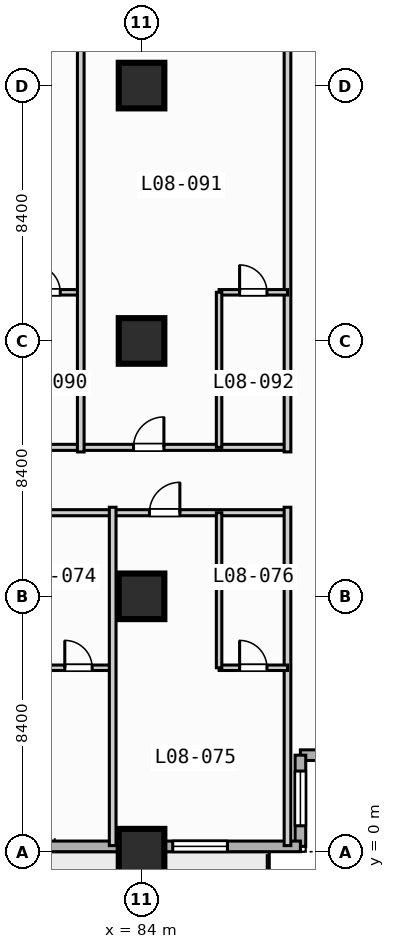
"""IFC4 building model, lengths in metres.
Left out: names, types, materials, properties, quantities, classifications, styles, units other than length and angle.
Written with IfcOpenShell. Run it as: python <this file> out.ifc"""

import sys

from ifc_helpers import new_model, si_unit, direction, frame, frame_2d, origin, origin_2d, place, context, subcontext, project, spatial, rectangle, extrude, element, fill, save


model = new_model("IFC4")
c1 = context("Model", 3, precision=1e-05, world=origin(), true_north=direction((0.0, 1.0)))
c2 = subcontext(c1, "Body", "Model", "MODEL_VIEW")
j1 = project(units=[si_unit("LENGTHUNIT", "METRE"), si_unit("PLANEANGLEUNIT", "RADIAN")], contexts=[c1])
p1 = place(None, origin())
s1 = spatial("IfcSite", under=j1, at=p1, CompositionType="ELEMENT")
p2 = place(p1, origin())
s2 = spatial("IfcBuilding", under=s1, at=p2, CompositionType="ELEMENT")
p3 = place(p2, frame((0.0, 0.0, 39.6)))
s3 = spatial("IfcBuildingStorey", under=s2, at=p3, CompositionType="ELEMENT", Elevation=39.6)
for number, where, z_axis, x_axis in (
    (1, (84.0, 0.0, 0.0), (0.0, 0.0, 1.0), (1.0, 0.0, 0.0)),
    (2, (84.0, 8.4, 0.0), (0.0, 0.0, 1.0), (1.0, 0.0, 0.0)),
    (3, (84.0, 16.8, 0.0), (0.0, 0.0, 1.0), (1.0, 0.0, 0.0)),
    (4, (84.0, 25.2, 0.0), (0.0, 0.0, 1.0), (1.0, 0.0, 0.0)),
):
    element("IfcColumn", number, at=place(p3, frame(where, z_axis=z_axis, x_axis=x_axis)), inside=s3, PredefinedType="COLUMN", context=c2, shape_type="SweptSolid", body=[
        extrude(rectangle(XDim=1.5, YDim=1.5, at=origin_2d()), origin(), (0.0, 0.0, 1.0), 3.8),
    ])
p4 = place(p3, frame((92.225, 3.175, 0.0), z_axis=(0.0, 0.0, 1.0), x_axis=(-1.0, 0.0, 0.0)))
e5 = element("IfcWall", 5, at=p4, inside=s3, PredefinedType="STANDARD", context=c2, shape_type="SweptSolid", body=[
    extrude(rectangle(XDim=3.0, YDim=0.35, at=frame_2d((1.5, 0.0))), origin(), (0.0, 0.0, 1.0), 3.55),
])
p5 = place(p3, frame((89.225, 3.175, 0.0), z_axis=(0.0, 0.0, 1.0), x_axis=(0.0, -1.0, 0.0)))
e6 = element("IfcWall", 6, at=p5, inside=s3, PredefinedType="STANDARD", context=c2, shape_type="SweptSolid", body=[
    extrude(rectangle(XDim=3.0, YDim=0.35, at=frame_2d((1.5, 0.0))), origin(), (0.0, 0.0, 1.0), 3.55),
])
p6 = place(p5, frame((0.522, 0.0, 0.85)))
e7 = element("IfcOpeningElement", 7, at=p6, cuts=e6, PredefinedType="OPENING", context=c2, shape_type="SweptSolid", body=[
    extrude(rectangle(XDim=1.8, YDim=1.8, at=frame_2d((0.9, 0.9))), frame((0.0, 0.185, 0.0), z_axis=(0.0, -1.0, 0.0), x_axis=(1.0, 0.0, 0.0)), (0.0, 0.0, 1.0), 0.37),
])
p7 = place(p3, frame((89.225, 0.175, 0.0), z_axis=(0.0, 0.0, 1.0), x_axis=(-1.0, 0.0, 0.0)))
e8 = element("IfcWall", 8, at=p7, inside=s3, PredefinedType="STANDARD", context=c2, shape_type="SweptSolid", body=[
    extrude(rectangle(XDim=86.05, YDim=0.35, at=frame_2d((43.025, 0.0))), origin(), (0.0, 0.0, 1.0), 3.55),
])
p8 = place(p7, frame((67.525, 0.0, 0.0)))
e9 = element("IfcOpeningElement", 9, at=p8, cuts=e8, PredefinedType="OPENING", context=c2, shape_type="SweptSolid", body=[
    extrude(rectangle(XDim=1.4, YDim=2.2, at=frame_2d((0.7, 1.1))), frame((0.0, 0.185, 0.0), z_axis=(0.0, -1.0, 0.0), x_axis=(1.0, 0.0, 0.0)), (0.0, 0.0, 1.0), 0.37),
])
p9 = place(p7, frame((58.725, 0.0, 0.85)))
e10 = element("IfcOpeningElement", 10, at=p9, cuts=e8, PredefinedType="OPENING", context=c2, shape_type="SweptSolid", body=[
    extrude(rectangle(XDim=2.2, YDim=1.8, at=frame_2d((1.1, 0.9))), frame((0.0, 0.185, 0.0), z_axis=(0.0, -1.0, 0.0), x_axis=(1.0, 0.0, 0.0)), (0.0, 0.0, 1.0), 0.37),
])
p10 = place(p7, frame((50.325, 0.0, 0.85)))
e11 = element("IfcOpeningElement", 11, at=p10, cuts=e8, PredefinedType="OPENING", context=c2, shape_type="SweptSolid", body=[
    extrude(rectangle(XDim=2.2, YDim=1.8, at=frame_2d((1.1, 0.9))), frame((0.0, 0.185, 0.0), z_axis=(0.0, -1.0, 0.0), x_axis=(1.0, 0.0, 0.0)), (0.0, 0.0, 1.0), 0.37),
])
p11 = place(p7, frame((41.925, 0.0, 0.85)))
e12 = element("IfcOpeningElement", 12, at=p11, cuts=e8, PredefinedType="OPENING", context=c2, shape_type="SweptSolid", body=[
    extrude(rectangle(XDim=2.2, YDim=1.8, at=frame_2d((1.1, 0.9))), frame((0.0, 0.185, 0.0), z_axis=(0.0, -1.0, 0.0), x_axis=(1.0, 0.0, 0.0)), (0.0, 0.0, 1.0), 0.37),
])
p12 = place(p7, frame((33.525, 0.0, 0.85)))
e13 = element("IfcOpeningElement", 13, at=p12, cuts=e8, PredefinedType="OPENING", context=c2, shape_type="SweptSolid", body=[
    extrude(rectangle(XDim=2.2, YDim=1.8, at=frame_2d((1.1, 0.9))), frame((0.0, 0.185, 0.0), z_axis=(0.0, -1.0, 0.0), x_axis=(1.0, 0.0, 0.0)), (0.0, 0.0, 1.0), 0.37),
])
p13 = place(p7, frame((16.725, 0.0, 0.85)))
e14 = element("IfcOpeningElement", 14, at=p13, cuts=e8, PredefinedType="OPENING", context=c2, shape_type="SweptSolid", body=[
    extrude(rectangle(XDim=2.2, YDim=1.8, at=frame_2d((1.1, 0.9))), frame((0.0, 0.185, 0.0), z_axis=(0.0, -1.0, 0.0), x_axis=(1.0, 0.0, 0.0)), (0.0, 0.0, 1.0), 0.37),
])
p14 = place(p7, frame((8.325, 0.0, 0.85)))
e15 = element("IfcOpeningElement", 15, at=p14, cuts=e8, PredefinedType="OPENING", context=c2, shape_type="SweptSolid", body=[
    extrude(rectangle(XDim=2.2, YDim=1.8, at=frame_2d((1.1, 0.9))), frame((0.0, 0.185, 0.0), z_axis=(0.0, -1.0, 0.0), x_axis=(1.0, 0.0, 0.0)), (0.0, 0.0, 1.0), 0.37),
])
p15 = place(p7, frame((2.4, 0.0, 0.85)))
e16 = element("IfcOpeningElement", 16, at=p15, cuts=e8, PredefinedType="OPENING", context=c2, shape_type="SweptSolid", body=[
    extrude(rectangle(XDim=1.8, YDim=1.8, at=frame_2d((0.9, 0.9))), frame((0.0, 0.185, 0.0), z_axis=(0.0, -1.0, 0.0), x_axis=(1.0, 0.0, 0.0)), (0.0, 0.0, 1.0), 0.37),
])
p16 = place(p3, frame((13.4, 11.15, 0.0), z_axis=(0.0, 0.0, 1.0), x_axis=(1.0, 0.0, 0.0)))
e17 = element("IfcWall", 17, at=p16, inside=s3, PredefinedType="PARTITIONING", context=c2, shape_type="SweptSolid", body=[
    extrude(rectangle(XDim=75.4, YDim=0.2, at=frame_2d((37.7, 0.0))), origin(), (0.0, 0.0, 1.0), 3.55),
])
p17 = place(p16, frame((6.065, 0.0, 0.0)))
e18 = element("IfcOpeningElement", 18, at=p17, cuts=e17, PredefinedType="OPENING", context=c2, shape_type="SweptSolid", body=[
    extrude(rectangle(XDim=1.0, YDim=2.15, at=frame_2d((0.5, 1.075))), frame((0.0, 0.11, 0.0), z_axis=(0.0, -1.0, 0.0), x_axis=(1.0, 0.0, 0.0)), (0.0, 0.0, 1.0), 0.22),
])
p18 = place(p16, frame((13.36, 0.0, 0.0)))
e19 = element("IfcOpeningElement", 19, at=p18, cuts=e17, PredefinedType="OPENING", context=c2, shape_type="SweptSolid", body=[
    extrude(rectangle(XDim=1.0, YDim=2.15, at=frame_2d((0.5, 1.075))), frame((0.0, 0.11, 0.0), z_axis=(0.0, -1.0, 0.0), x_axis=(1.0, 0.0, 0.0)), (0.0, 0.0, 1.0), 0.22),
])
p19 = place(p16, frame((21.785, 0.0, 0.0)))
e20 = element("IfcOpeningElement", 20, at=p19, cuts=e17, PredefinedType="OPENING", context=c2, shape_type="SweptSolid", body=[
    extrude(rectangle(XDim=1.0, YDim=2.15, at=frame_2d((0.5, 1.075))), frame((0.0, 0.11, 0.0), z_axis=(0.0, -1.0, 0.0), x_axis=(1.0, 0.0, 0.0)), (0.0, 0.0, 1.0), 0.22),
])
p20 = place(p16, frame((30.185, 0.0, 0.0)))
e21 = element("IfcOpeningElement", 21, at=p20, cuts=e17, PredefinedType="OPENING", context=c2, shape_type="SweptSolid", body=[
    extrude(rectangle(XDim=1.0, YDim=2.15, at=frame_2d((0.5, 1.075))), frame((0.0, 0.11, 0.0), z_axis=(0.0, -1.0, 0.0), x_axis=(1.0, 0.0, 0.0)), (0.0, 0.0, 1.0), 0.22),
])
p21 = place(p16, frame((41.76, 0.0, 0.0)))
e22 = element("IfcOpeningElement", 22, at=p21, cuts=e17, PredefinedType="OPENING", context=c2, shape_type="SweptSolid", body=[
    extrude(rectangle(XDim=1.0, YDim=2.15, at=frame_2d((0.5, 1.075))), frame((0.0, 0.11, 0.0), z_axis=(0.0, -1.0, 0.0), x_axis=(1.0, 0.0, 0.0)), (0.0, 0.0, 1.0), 0.22),
])
p22 = place(p16, frame((54.36, 0.0, 0.0)))
e23 = element("IfcOpeningElement", 23, at=p22, cuts=e17, PredefinedType="OPENING", context=c2, shape_type="SweptSolid", body=[
    extrude(rectangle(XDim=1.0, YDim=2.15, at=frame_2d((0.5, 1.075))), frame((0.0, 0.11, 0.0), z_axis=(0.0, -1.0, 0.0), x_axis=(1.0, 0.0, 0.0)), (0.0, 0.0, 1.0), 0.22),
])
p23 = place(p16, frame((63.785, 0.0, 0.0)))
e24 = element("IfcOpeningElement", 24, at=p23, cuts=e17, PredefinedType="OPENING", context=c2, shape_type="SweptSolid", body=[
    extrude(rectangle(XDim=1.0, YDim=2.15, at=frame_2d((0.5, 1.075))), frame((0.0, 0.11, 0.0), z_axis=(0.0, -1.0, 0.0), x_axis=(1.0, 0.0, 0.0)), (0.0, 0.0, 1.0), 0.22),
])
p24 = place(p16, frame((70.86, 0.0, 0.0)))
e25 = element("IfcOpeningElement", 25, at=p24, cuts=e17, PredefinedType="OPENING", context=c2, shape_type="SweptSolid", body=[
    extrude(rectangle(XDim=1.0, YDim=2.15, at=frame_2d((0.5, 1.075))), frame((0.0, 0.11, 0.0), z_axis=(0.0, -1.0, 0.0), x_axis=(1.0, 0.0, 0.0)), (0.0, 0.0, 1.0), 0.22),
])
p25 = place(p3, frame((80.8, 6.05, 0.0), z_axis=(0.0, 0.0, 1.0), x_axis=(1.0, 0.0, 0.0)))
e26 = element("IfcWall", 26, at=p25, inside=s3, PredefinedType="PLUMBINGWALL", context=c2, shape_type="SweptSolid", body=[
    extrude(rectangle(XDim=2.25, YDim=0.18, at=frame_2d((1.125, 0.0))), origin(), (0.0, 0.0, 1.0), 3.55),
])
p26 = place(p25, frame((0.675, 0.0, 0.0)))
e27 = element("IfcOpeningElement", 27, at=p26, cuts=e26, PredefinedType="OPENING", context=c2, shape_type="SweptSolid", body=[
    extrude(rectangle(XDim=0.9, YDim=2.1, at=frame_2d((0.45, 1.05))), frame((0.0, 0.1, 0.0), z_axis=(0.0, -1.0, 0.0), x_axis=(1.0, 0.0, 0.0)), (0.0, 0.0, 1.0), 0.2),
])
for number, where, z_axis, x_axis in (
    (28, (83.05, 0.2, 0.0), (0.0, 0.0, 1.0), (0.0, 1.0, 0.0)),
    (29, (88.8, 0.2, 0.0), (0.0, 0.0, 1.0), (0.0, 1.0, 0.0)),
):
    element("IfcWall", number, at=place(p3, frame(where, z_axis=z_axis, x_axis=x_axis)), inside=s3, PredefinedType="PARTITIONING", context=c2, shape_type="SweptSolid", body=[
        extrude(rectangle(XDim=11.13, YDim=0.22, at=frame_2d((5.565, 0.0))), origin(), (0.0, 0.0, 1.0), 3.55),
    ])
p27 = place(p3, frame((86.55, 6.05, 0.0), z_axis=(0.0, 0.0, 1.0), x_axis=(1.0, 0.0, 0.0)))
e30 = element("IfcWall", 30, at=p27, inside=s3, PredefinedType="PLUMBINGWALL", context=c2, shape_type="SweptSolid", body=[
    extrude(rectangle(XDim=2.25, YDim=0.18, at=frame_2d((1.125, 0.0))), origin(), (0.0, 0.0, 1.0), 3.55),
])
p28 = place(p27, frame((0.675, 0.0, 0.0)))
e31 = element("IfcOpeningElement", 31, at=p28, cuts=e30, PredefinedType="OPENING", context=c2, shape_type="SweptSolid", body=[
    extrude(rectangle(XDim=0.9, YDim=2.1, at=frame_2d((0.45, 1.05))), frame((0.0, 0.1, 0.0), z_axis=(0.0, -1.0, 0.0), x_axis=(1.0, 0.0, 0.0)), (0.0, 0.0, 1.0), 0.2),
])
p29 = place(p3, frame((86.55, 6.05, 0.0), z_axis=(0.0, 0.0, 1.0), x_axis=(0.0, 1.0, 0.0)))
e32 = element("IfcWall", 32, at=p29, inside=s3, PredefinedType="PLUMBINGWALL", context=c2, shape_type="SweptSolid", body=[
    extrude(rectangle(XDim=5.1, YDim=0.18, at=frame_2d((2.55, 0.0))), origin(), (0.0, 0.0, 1.0), 3.55),
])
p30 = place(p3, frame((61.6, 13.3, 0.0), z_axis=(0.0, 0.0, 1.0), x_axis=(1.0, 0.0, 0.0)))
e33 = element("IfcWall", 33, at=p30, inside=s3, PredefinedType="PARTITIONING", context=c2, shape_type="SweptSolid", body=[
    extrude(rectangle(XDim=27.2, YDim=0.2, at=frame_2d((13.6, 0.0))), origin(), (0.0, 0.0, 1.0), 3.55),
])
p31 = place(p30, frame((4.465, 0.0, 0.0)))
e34 = element("IfcOpeningElement", 34, at=p31, cuts=e33, PredefinedType="OPENING", context=c2, shape_type="SweptSolid", body=[
    extrude(rectangle(XDim=1.0, YDim=2.15, at=frame_2d((0.5, 1.075))), frame((0.0, 0.11, 0.0), z_axis=(0.0, -1.0, 0.0), x_axis=(1.0, 0.0, 0.0)), (0.0, 0.0, 1.0), 0.22),
])
p32 = place(p30, frame((11.465, 0.0, 0.0)))
e35 = element("IfcOpeningElement", 35, at=p32, cuts=e33, PredefinedType="OPENING", context=c2, shape_type="SweptSolid", body=[
    extrude(rectangle(XDim=1.0, YDim=2.15, at=frame_2d((0.5, 1.075))), frame((0.0, 0.11, 0.0), z_axis=(0.0, -1.0, 0.0), x_axis=(1.0, 0.0, 0.0)), (0.0, 0.0, 1.0), 0.22),
])
p33 = place(p30, frame((15.535, 0.0, 0.0)))
e36 = element("IfcOpeningElement", 36, at=p33, cuts=e33, PredefinedType="OPENING", context=c2, shape_type="SweptSolid", body=[
    extrude(rectangle(XDim=1.0, YDim=2.15, at=frame_2d((0.5, 1.075))), frame((0.0, 0.11, 0.0), z_axis=(0.0, -1.0, 0.0), x_axis=(1.0, 0.0, 0.0)), (0.0, 0.0, 1.0), 0.22),
])
p34 = place(p30, frame((22.135, 0.0, 0.0)))
e37 = element("IfcOpeningElement", 37, at=p34, cuts=e33, PredefinedType="OPENING", context=c2, shape_type="SweptSolid", body=[
    extrude(rectangle(XDim=1.0, YDim=2.15, at=frame_2d((0.5, 1.075))), frame((0.0, 0.11, 0.0), z_axis=(0.0, -1.0, 0.0), x_axis=(1.0, 0.0, 0.0)), (0.0, 0.0, 1.0), 0.22),
])
p35 = place(p3, frame((79.75, 18.4, 0.0), z_axis=(0.0, 0.0, 1.0), x_axis=(1.0, 0.0, 0.0)))
e38 = element("IfcWall", 38, at=p35, inside=s3, PredefinedType="PLUMBINGWALL", context=c2, shape_type="SweptSolid", body=[
    extrude(rectangle(XDim=2.25, YDim=0.18, at=frame_2d((1.125, 0.0))), origin(), (0.0, 0.0, 1.0), 3.55),
])
p36 = place(p35, frame((0.675, 0.0, 0.0)))
e39 = element("IfcOpeningElement", 39, at=p36, cuts=e38, PredefinedType="OPENING", context=c2, shape_type="SweptSolid", body=[
    extrude(rectangle(XDim=0.9, YDim=2.1, at=frame_2d((0.45, 1.05))), frame((0.0, 0.1, 0.0), z_axis=(0.0, -1.0, 0.0), x_axis=(1.0, 0.0, 0.0)), (0.0, 0.0, 1.0), 0.2),
])
for number, where, z_axis, x_axis in (
    (40, (82.0, 13.15, 0.0), (0.0, 0.0, 1.0), (0.0, 1.0, 0.0)),
    (41, (88.8, 13.15, 0.0), (0.0, 0.0, 1.0), (0.0, 1.0, 0.0)),
):
    element("IfcWall", number, at=place(p3, frame(where, z_axis=z_axis, x_axis=x_axis)), inside=s3, PredefinedType="PARTITIONING", context=c2, shape_type="SweptSolid", body=[
        extrude(rectangle(XDim=20.28, YDim=0.22, at=frame_2d((10.14, 0.0))), origin(), (0.0, 0.0, 1.0), 3.55),
    ])
p37 = place(p3, frame((86.55, 18.4, 0.0), z_axis=(0.0, 0.0, 1.0), x_axis=(1.0, 0.0, 0.0)))
e42 = element("IfcWall", 42, at=p37, inside=s3, PredefinedType="PLUMBINGWALL", context=c2, shape_type="SweptSolid", body=[
    extrude(rectangle(XDim=2.25, YDim=0.18, at=frame_2d((1.125, 0.0))), origin(), (0.0, 0.0, 1.0), 3.55),
])
p38 = place(p37, frame((0.675, 0.0, 0.0)))
e43 = element("IfcOpeningElement", 43, at=p38, cuts=e42, PredefinedType="OPENING", context=c2, shape_type="SweptSolid", body=[
    extrude(rectangle(XDim=0.9, YDim=2.1, at=frame_2d((0.45, 1.05))), frame((0.0, 0.1, 0.0), z_axis=(0.0, -1.0, 0.0), x_axis=(1.0, 0.0, 0.0)), (0.0, 0.0, 1.0), 0.2),
])
p39 = place(p3, frame((86.55, 13.3, 0.0), z_axis=(0.0, 0.0, 1.0), x_axis=(0.0, 1.0, 0.0)))
e44 = element("IfcWall", 44, at=p39, inside=s3, PredefinedType="PLUMBINGWALL", context=c2, shape_type="SweptSolid", body=[
    extrude(rectangle(XDim=5.1, YDim=0.18, at=frame_2d((2.55, 0.0))), origin(), (0.0, 0.0, 1.0), 3.55),
])
p40 = place(p6, origin())
e45 = element("IfcWindow", 45, at=p40, inside=s3, PartitioningType="SINGLE_PANEL", PredefinedType="WINDOW", context=c2, shape_type="SweptSolid", body=[
    extrude(rectangle(XDim=1.8, YDim=1.8, at=frame_2d((0.9, 0.9))), frame((0.0, 0.03, 0.0), z_axis=(0.0, -1.0, 0.0), x_axis=(1.0, 0.0, 0.0)), (0.0, 0.0, 1.0), 0.06),
])
fill(e7, e45)
p41 = place(p15, origin())
e46 = element("IfcWindow", 46, at=p41, inside=s3, PartitioningType="SINGLE_PANEL", PredefinedType="WINDOW", context=c2, shape_type="SweptSolid", body=[
    extrude(rectangle(XDim=1.8, YDim=1.8, at=frame_2d((0.9, 0.9))), frame((0.0, 0.03, 0.0), z_axis=(0.0, -1.0, 0.0), x_axis=(1.0, 0.0, 0.0)), (0.0, 0.0, 1.0), 0.06),
])
fill(e16, e46)
p42 = place(p24, origin())
e47 = element("IfcDoor", 47, at=p42, inside=s3, OperationType="SINGLE_SWING_RIGHT", PredefinedType="DOOR", context=c2, shape_type="SweptSolid", body=[
    extrude(rectangle(XDim=1.0, YDim=2.15, at=frame_2d((0.5, 1.075))), frame((0.0, 0.025, 0.0), z_axis=(0.0, -1.0, 0.0), x_axis=(1.0, 0.0, 0.0)), (0.0, 0.0, 1.0), 0.05),
])
fill(e25, e47)
p43 = place(p26, origin())
e48 = element("IfcDoor", 48, at=p43, inside=s3, OperationType="SINGLE_SWING_LEFT", PredefinedType="DOOR", context=c2, shape_type="SweptSolid", body=[
    extrude(rectangle(XDim=0.9, YDim=2.1, at=frame_2d((0.45, 1.05))), frame((0.0, 0.025, 0.0), z_axis=(0.0, -1.0, 0.0), x_axis=(1.0, 0.0, 0.0)), (0.0, 0.0, 1.0), 0.05),
])
fill(e27, e48)
p44 = place(p28, origin())
e49 = element("IfcDoor", 49, at=p44, inside=s3, OperationType="SINGLE_SWING_LEFT", PredefinedType="DOOR", context=c2, shape_type="SweptSolid", body=[
    extrude(rectangle(XDim=0.9, YDim=2.1, at=frame_2d((0.45, 1.05))), frame((0.0, 0.025, 0.0), z_axis=(0.0, -1.0, 0.0), x_axis=(1.0, 0.0, 0.0)), (0.0, 0.0, 1.0), 0.05),
])
fill(e31, e49)
p45 = place(p34, origin())
e50 = element("IfcDoor", 50, at=p45, inside=s3, OperationType="SINGLE_SWING_RIGHT", PredefinedType="DOOR", context=c2, shape_type="SweptSolid", body=[
    extrude(rectangle(XDim=1.0, YDim=2.15, at=frame_2d((0.5, 1.075))), frame((0.0, 0.025, 0.0), z_axis=(0.0, -1.0, 0.0), x_axis=(1.0, 0.0, 0.0)), (0.0, 0.0, 1.0), 0.05),
])
fill(e37, e50)
p46 = place(p36, origin())
e51 = element("IfcDoor", 51, at=p46, inside=s3, OperationType="SINGLE_SWING_LEFT", PredefinedType="DOOR", context=c2, shape_type="SweptSolid", body=[
    extrude(rectangle(XDim=0.9, YDim=2.1, at=frame_2d((0.45, 1.05))), frame((0.0, 0.025, 0.0), z_axis=(0.0, -1.0, 0.0), x_axis=(1.0, 0.0, 0.0)), (0.0, 0.0, 1.0), 0.05),
])
fill(e39, e51)
p47 = place(p38, origin())
e52 = element("IfcDoor", 52, at=p47, inside=s3, OperationType="SINGLE_SWING_LEFT", PredefinedType="DOOR", context=c2, shape_type="SweptSolid", body=[
    extrude(rectangle(XDim=0.9, YDim=2.1, at=frame_2d((0.45, 1.05))), frame((0.0, 0.025, 0.0), z_axis=(0.0, -1.0, 0.0), x_axis=(1.0, 0.0, 0.0)), (0.0, 0.0, 1.0), 0.05),
])
fill(e43, e52)
save(model, sys.argv[1])
